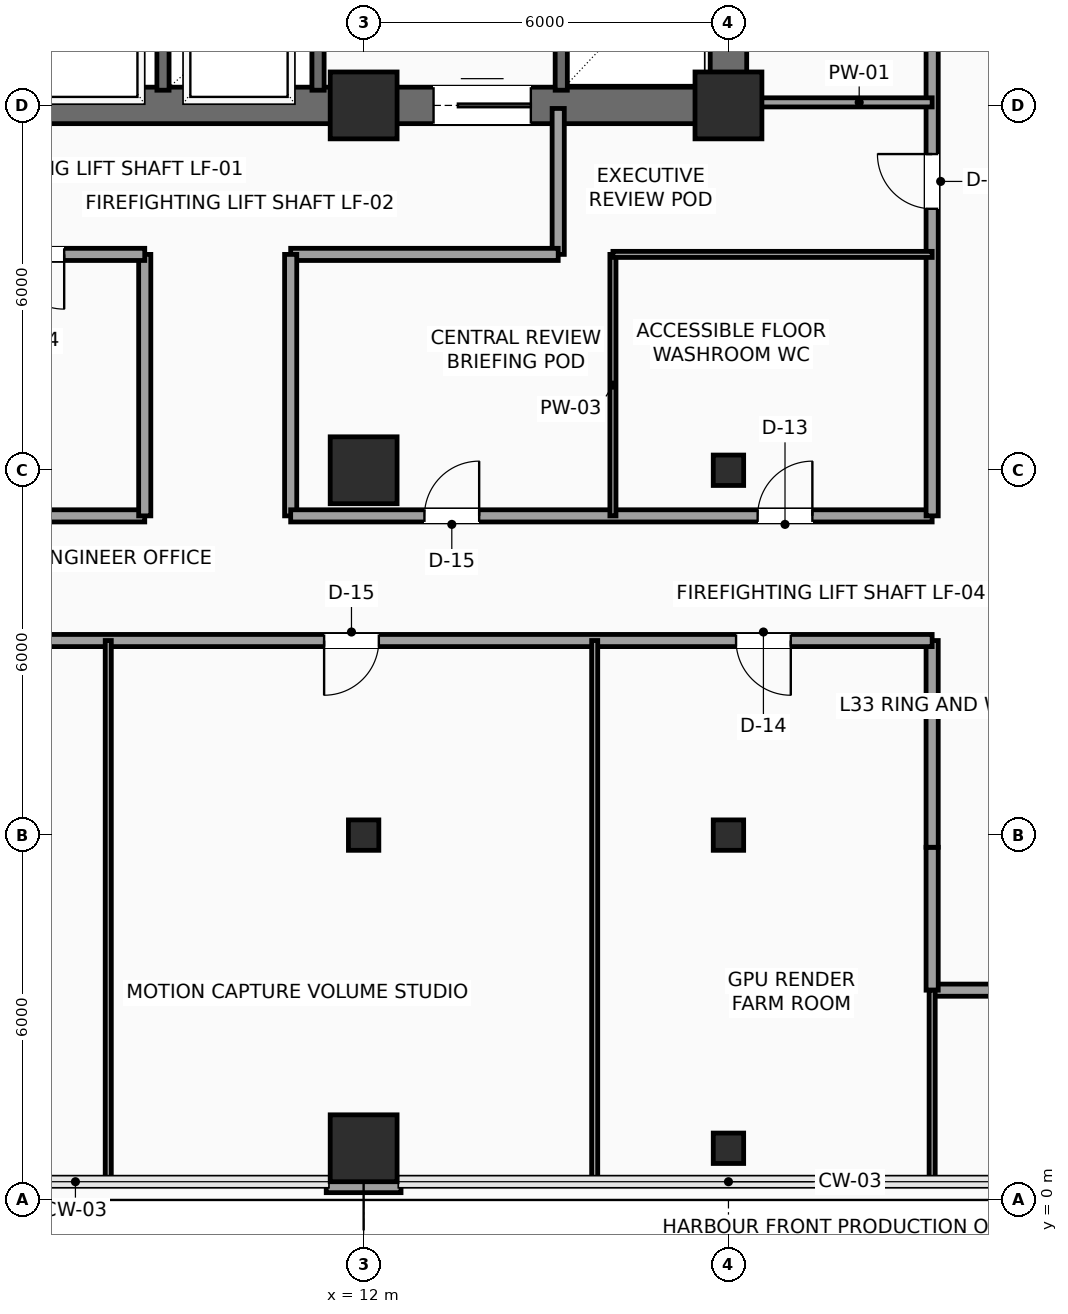
"""IFC4 building model, lengths in metres.
Left out: names, types, materials, properties, quantities, classifications, styles, units other than length and angle.
Written with IfcOpenShell. Run it as: python <this file> out.ifc"""

import sys

from ifc_helpers import new_model, si_unit, direction, frame, frame_2d, origin, origin_2d, place, context, subcontext, project, spatial, rectangle, hollow_rectangle, extrude, element, fill, save


model = new_model("IFC4")
c1 = context("Model", 3, precision=1e-05, world=origin(), true_north=direction((0.0, 1.0)))
c2 = subcontext(c1, "Body", "Model", "MODEL_VIEW")
j1 = project(units=[si_unit("LENGTHUNIT", "METRE"), si_unit("PLANEANGLEUNIT", "RADIAN")], contexts=[c1])
p1 = place(None, origin())
s1 = spatial("IfcSite", under=j1, at=p1, CompositionType="ELEMENT")
p2 = place(p1, origin())
s2 = spatial("IfcBuilding", under=s1, at=p2, CompositionType="ELEMENT")
p3 = place(p2, frame((0.0, 0.0, 138.15)))
s3 = spatial("IfcBuildingStorey", under=s2, at=p3, CompositionType="ELEMENT", Elevation=138.15)
for number, where, z_axis, x_axis in (
    (1, (12.0, 18.0, 0.0), (0.0, 0.0, 1.0), (1.0, 0.0, 0.0)),
    (2, (18.0, 18.0, 0.0), (0.0, 0.0, 1.0), (1.0, 0.0, 0.0)),
    (3, (12.0, 0.85, 0.0), (0.0, 0.0, 1.0), (1.0, 0.0, 0.0)),
):
    element("IfcColumn", number, at=place(p3, frame(where, z_axis=z_axis, x_axis=x_axis)), inside=s3, PredefinedType="COLUMN", context=c2, shape_type="SweptSolid", body=[
        extrude(rectangle(XDim=1.1, YDim=1.1, at=origin_2d()), origin(), (0.0, 0.0, 1.0), 3.75),
    ])
p4 = place(p3, frame((12.0, 6.0, 0.0), z_axis=(0.0, 0.0, 1.0), x_axis=(1.0, 0.0, 0.0)))
e4 = element("IfcColumn", 4, at=p4, inside=s3, PredefinedType="COLUMN", context=c2, shape_type="SweptSolid", body=[
    extrude(hollow_rectangle(XDim=0.5, YDim=0.5, WallThickness=0.025, InnerFilletRadius=0.025, OuterFilletRadius=0.04, at=origin_2d()), origin(), (0.0, 0.0, 1.0), 3.75),
])
p5 = place(p3, frame((12.0, 12.0, 0.0), z_axis=(0.0, 0.0, 1.0), x_axis=(1.0, 0.0, 0.0)))
e5 = element("IfcColumn", 5, at=p5, inside=s3, PredefinedType="COLUMN", context=c2, shape_type="SweptSolid", body=[
    extrude(rectangle(XDim=1.1, YDim=1.1, at=origin_2d()), origin(), (0.0, 0.0, 1.0), 3.75),
])
for number, where, z_axis, x_axis in (
    (6, (18.0, 0.85, 0.0), (0.0, 0.0, 1.0), (1.0, 0.0, 0.0)),
    (7, (18.0, 6.0, 0.0), (0.0, 0.0, 1.0), (1.0, 0.0, 0.0)),
    (8, (18.0, 12.0, 0.0), (0.0, 0.0, 1.0), (1.0, 0.0, 0.0)),
):
    element("IfcColumn", number, at=place(p3, frame(where, z_axis=z_axis, x_axis=x_axis)), inside=s3, PredefinedType="COLUMN", context=c2, shape_type="SweptSolid", body=[
        extrude(hollow_rectangle(XDim=0.5, YDim=0.5, WallThickness=0.025, InnerFilletRadius=0.025, OuterFilletRadius=0.04, at=origin_2d()), origin(), (0.0, 0.0, 1.0), 3.75),
    ])
p6 = place(p3, frame((12.615, 0.24, 0.0), z_axis=(0.0, 0.0, 1.0), x_axis=(-1.0, 0.0, 0.0)))
e9 = element("IfcWall", 9, at=p6, inside=s3, PredefinedType="SOLIDWALL", context=c2, shape_type="SweptSolid", body=[
    extrude(rectangle(XDim=1.23, YDim=0.24, at=frame_2d((0.615, 0.0))), origin(), (0.0, 0.0, 1.0), 3.525),
])
p7 = place(p3, frame((6.0, 18.0, 0.0), z_axis=(0.0, 0.0, 1.0), x_axis=(1.0, 0.0, 0.0)))
e10 = element("IfcWall", 10, at=p7, inside=s3, PredefinedType="SHEAR", context=c2, shape_type="SweptSolid", body=[
    extrude(rectangle(XDim=12.0, YDim=0.6, at=frame_2d((6.0, 0.0))), origin(), (0.0, 0.0, 1.0), 3.525),
])
p8 = place(p7, frame((7.15, 0.0, 0.0)))
e11 = element("IfcOpeningElement", 11, at=p8, cuts=e10, PredefinedType="OPENING", context=c2, shape_type="SweptSolid", body=[
    extrude(rectangle(XDim=1.6, YDim=2.3, at=frame_2d((0.8, 1.15))), frame((0.0, 0.31, 0.0), z_axis=(0.0, -1.0, 0.0), x_axis=(1.0, 0.0, 0.0)), (0.0, 0.0, 1.0), 0.62),
])
p9 = place(p3, frame((18.0, 18.0, 0.0), z_axis=(0.0, 0.0, 1.0), x_axis=(0.0, 1.0, 0.0)))
e12 = element("IfcWall", 12, at=p9, inside=s3, PredefinedType="SHEAR", context=c2, shape_type="SweptSolid", body=[
    extrude(rectangle(XDim=9.6, YDim=0.6, at=frame_2d((4.8, 0.0))), origin(), (0.0, 0.0, 1.0), 3.525),
])
for number, where, z_axis, x_axis in (
    (13, (8.7, 18.25, 0.0), (0.0, 0.0, 1.0), (0.0, 1.0, 0.0)),
    (14, (11.25, 18.25, 0.0), (0.0, 0.0, 1.0), (0.0, 1.0, 0.0)),
):
    element("IfcWall", number, at=place(p3, frame(where, z_axis=z_axis, x_axis=x_axis)), inside=s3, PredefinedType="SHEAR", context=c2, shape_type="SweptSolid", body=[
        extrude(rectangle(XDim=2.17, YDim=0.2, at=frame_2d((1.085, 0.0))), origin(), (0.0, 0.0, 1.0), 3.525),
    ])
p10 = place(p3, frame((15.25, 18.25, 0.0), z_axis=(0.0, 0.0, 1.0), x_axis=(0.0, 1.0, 0.0)))
e15 = element("IfcWall", 15, at=p10, inside=s3, PredefinedType="SHEAR", context=c2, shape_type="SweptSolid", body=[
    extrude(rectangle(XDim=5.2, YDim=0.2, at=frame_2d((2.6, 0.0))), origin(), (0.0, 0.0, 1.0), 3.525),
])
p11 = place(p3, frame((23.95, 3.45, 0.0), z_axis=(0.0, 0.0, 1.0), x_axis=(-1.0, 0.0, 0.0)))
e16 = element("IfcWall", 16, at=p11, inside=s3, PredefinedType="PARTITIONING", context=c2, shape_type="SweptSolid", body=[
    extrude(rectangle(XDim=2.6, YDim=0.2, at=frame_2d((1.3, 0.0))), origin(), (0.0, 0.0, 1.0), 3.067),
])
p12 = place(p3, frame((21.35, 3.45, 0.0), z_axis=(0.0, 0.0, 1.0), x_axis=(0.0, 1.0, 0.0)))
e17 = element("IfcWall", 17, at=p12, inside=s3, PredefinedType="PARTITIONING", context=c2, shape_type="SweptSolid", body=[
    extrude(rectangle(XDim=2.35, YDim=0.2, at=frame_2d((1.175, 0.0))), origin(), (0.0, 0.0, 1.0), 3.525),
])
p13 = place(p3, frame((21.35, 5.8, 0.0), z_axis=(0.0, 0.0, 1.0), x_axis=(0.0, 1.0, 0.0)))
e18 = element("IfcWall", 18, at=p13, inside=s3, PredefinedType="PARTITIONING", context=c2, shape_type="SweptSolid", body=[
    extrude(rectangle(XDim=3.4, YDim=0.2, at=frame_2d((1.7, 0.0))), origin(), (0.0, 0.0, 1.0), 3.525),
])
p14 = place(p3, frame((21.35, 9.2, 0.0), z_axis=(0.0, 0.0, 1.0), x_axis=(-1.0, 0.0, 0.0)))
e19 = element("IfcWall", 19, at=p14, inside=s3, PredefinedType="PARTITIONING", context=c2, shape_type="SweptSolid", body=[
    extrude(rectangle(XDim=18.15, YDim=0.2, at=frame_2d((9.075, 0.0))), origin(), (0.0, 0.0, 1.0), 3.067),
])
p15 = place(p14, frame((15.4, 0.0, 0.0)))
e20 = element("IfcOpeningElement", 20, at=p15, cuts=e19, PredefinedType="OPENING", context=c2, shape_type="SweptSolid", body=[
    extrude(rectangle(XDim=0.9, YDim=2.1, at=frame_2d((0.45, 1.05))), frame((0.0, 0.11, 0.0), z_axis=(0.0, -1.0, 0.0), x_axis=(1.0, 0.0, 0.0)), (0.0, 0.0, 1.0), 0.22),
])
p16 = place(p14, frame((9.1, 0.0, 0.0)))
e21 = element("IfcOpeningElement", 21, at=p16, cuts=e19, PredefinedType="OPENING", context=c2, shape_type="SweptSolid", body=[
    extrude(rectangle(XDim=0.9, YDim=2.1, at=frame_2d((0.45, 1.05))), frame((0.0, 0.11, 0.0), z_axis=(0.0, -1.0, 0.0), x_axis=(1.0, 0.0, 0.0)), (0.0, 0.0, 1.0), 0.22),
])
p17 = place(p14, frame((2.325, 0.0, 0.0)))
e22 = element("IfcOpeningElement", 22, at=p17, cuts=e19, PredefinedType="OPENING", context=c2, shape_type="SweptSolid", body=[
    extrude(rectangle(XDim=0.9, YDim=2.1, at=frame_2d((0.45, 1.05))), frame((0.0, 0.11, 0.0), z_axis=(0.0, -1.0, 0.0), x_axis=(1.0, 0.0, 0.0)), (0.0, 0.0, 1.0), 0.22),
])
p18 = place(p3, frame((3.2, 11.25, 0.0), z_axis=(0.0, 0.0, 1.0), x_axis=(1.0, 0.0, 0.0)))
e23 = element("IfcWall", 23, at=p18, inside=s3, PredefinedType="PARTITIONING", context=c2, shape_type="SweptSolid", body=[
    extrude(rectangle(XDim=5.2, YDim=0.2, at=frame_2d((2.6, 0.0))), origin(), (0.0, 0.0, 1.0), 3.525),
])
p19 = place(p3, frame((8.4, 11.25, 0.0), z_axis=(0.0, 0.0, 1.0), x_axis=(0.0, 1.0, 0.0)))
e24 = element("IfcWall", 24, at=p19, inside=s3, PredefinedType="PARTITIONING", context=c2, shape_type="SweptSolid", body=[
    extrude(rectangle(XDim=4.3, YDim=0.2, at=frame_2d((2.15, 0.0))), origin(), (0.0, 0.0, 1.0), 3.525),
])
p20 = place(p3, frame((8.4, 15.55, 0.0), z_axis=(0.0, 0.0, 1.0), x_axis=(-1.0, 0.0, 0.0)))
e25 = element("IfcWall", 25, at=p20, inside=s3, PredefinedType="PARTITIONING", context=c2, shape_type="SweptSolid", body=[
    extrude(rectangle(XDim=8.1, YDim=0.2, at=frame_2d((4.05, 0.0))), origin(), (0.0, 0.0, 1.0), 3.525),
])
p21 = place(p20, frame((5.35, 0.0, 0.0)))
e26 = element("IfcOpeningElement", 26, at=p21, cuts=e25, PredefinedType="OPENING", context=c2, shape_type="SweptSolid", body=[
    extrude(rectangle(XDim=0.9, YDim=2.1, at=frame_2d((0.45, 1.05))), frame((0.0, 0.11, 0.0), z_axis=(0.0, -1.0, 0.0), x_axis=(1.0, 0.0, 0.0)), (0.0, 0.0, 1.0), 0.22),
])
p22 = place(p20, frame((1.325, 0.0, 0.0)))
e27 = element("IfcOpeningElement", 27, at=p22, cuts=e25, PredefinedType="OPENING", context=c2, shape_type="SweptSolid", body=[
    extrude(rectangle(XDim=0.9, YDim=2.1, at=frame_2d((0.45, 1.05))), frame((0.0, 0.11, 0.0), z_axis=(0.0, -1.0, 0.0), x_axis=(1.0, 0.0, 0.0)), (0.0, 0.0, 1.0), 0.22),
])
p23 = place(p3, frame((15.2, 17.95, 0.0), z_axis=(0.0, 0.0, 1.0), x_axis=(0.0, -1.0, 0.0)))
e28 = element("IfcWall", 28, at=p23, inside=s3, PredefinedType="PARTITIONING", context=c2, shape_type="SweptSolid", body=[
    extrude(rectangle(XDim=2.4, YDim=0.2, at=frame_2d((1.2, 0.0))), origin(), (0.0, 0.0, 1.0), 3.525),
])
p24 = place(p3, frame((15.2, 15.55, 0.0), z_axis=(0.0, 0.0, 1.0), x_axis=(-1.0, 0.0, 0.0)))
e29 = element("IfcWall", 29, at=p24, inside=s3, PredefinedType="PARTITIONING", context=c2, shape_type="SweptSolid", body=[
    extrude(rectangle(XDim=4.4, YDim=0.2, at=frame_2d((2.2, 0.0))), origin(), (0.0, 0.0, 1.0), 3.525),
])
p25 = place(p3, frame((10.8, 15.55, 0.0), z_axis=(0.0, 0.0, 1.0), x_axis=(0.0, -1.0, 0.0)))
e30 = element("IfcWall", 30, at=p25, inside=s3, PredefinedType="PARTITIONING", context=c2, shape_type="SweptSolid", body=[
    extrude(rectangle(XDim=4.3, YDim=0.2, at=frame_2d((2.15, 0.0))), origin(), (0.0, 0.0, 1.0), 3.525),
])
p26 = place(p3, frame((10.8, 11.25, 0.0), z_axis=(0.0, 0.0, 1.0), x_axis=(1.0, 0.0, 0.0)))
e31 = element("IfcWall", 31, at=p26, inside=s3, PredefinedType="PARTITIONING", context=c2, shape_type="SweptSolid", body=[
    extrude(rectangle(XDim=10.55, YDim=0.2, at=frame_2d((5.275, 0.0))), origin(), (0.0, 0.0, 1.0), 3.525),
])
p27 = place(p26, frame((2.2, 0.0, 0.0)))
e32 = element("IfcOpeningElement", 32, at=p27, cuts=e31, PredefinedType="OPENING", context=c2, shape_type="SweptSolid", body=[
    extrude(rectangle(XDim=0.9, YDim=2.1, at=frame_2d((0.45, 1.05))), frame((0.0, 0.11, 0.0), z_axis=(0.0, -1.0, 0.0), x_axis=(1.0, 0.0, 0.0)), (0.0, 0.0, 1.0), 0.22),
])
p28 = place(p26, frame((7.68, 0.0, 0.0)))
e33 = element("IfcOpeningElement", 33, at=p28, cuts=e31, PredefinedType="OPENING", context=c2, shape_type="SweptSolid", body=[
    extrude(rectangle(XDim=0.9, YDim=2.1, at=frame_2d((0.45, 1.05))), frame((0.0, 0.11, 0.0), z_axis=(0.0, -1.0, 0.0), x_axis=(1.0, 0.0, 0.0)), (0.0, 0.0, 1.0), 0.22),
])
p29 = place(p3, frame((21.35, 11.25, 0.0), z_axis=(0.0, 0.0, 1.0), x_axis=(0.0, 1.0, 0.0)))
e34 = element("IfcWall", 34, at=p29, inside=s3, PredefinedType="PARTITIONING", context=c2, shape_type="SweptSolid", body=[
    extrude(rectangle(XDim=19.0, YDim=0.2, at=frame_2d((9.5, 0.0))), origin(), (0.0, 0.0, 1.0), 3.525),
])
p30 = place(p29, frame((8.7, 0.0, 0.0)))
e35 = element("IfcOpeningElement", 35, at=p30, cuts=e34, PredefinedType="OPENING", context=c2, shape_type="SweptSolid", body=[
    extrude(rectangle(XDim=0.95, YDim=2.15, at=frame_2d((0.475, 1.075))), frame((0.0, 0.11, 0.0), z_axis=(0.0, -1.0, 0.0), x_axis=(1.0, 0.0, 0.0)), (0.0, 0.0, 1.0), 0.22),
])
p31 = place(p29, frame((13.475, 0.0, 0.0)))
e36 = element("IfcOpeningElement", 36, at=p31, cuts=e34, PredefinedType="OPENING", context=c2, shape_type="SweptSolid", body=[
    extrude(rectangle(XDim=0.9, YDim=2.1, at=frame_2d((0.45, 1.05))), frame((0.0, 0.11, 0.0), z_axis=(0.0, -1.0, 0.0), x_axis=(1.0, 0.0, 0.0)), (0.0, 0.0, 1.0), 0.22),
])
p32 = place(p29, frame((5.05, 0.0, 0.0)))
e37 = element("IfcOpeningElement", 37, at=p32, cuts=e34, PredefinedType="OPENING", context=c2, shape_type="SweptSolid", body=[
    extrude(rectangle(XDim=0.9, YDim=2.1, at=frame_2d((0.45, 1.05))), frame((0.0, 0.11, 0.0), z_axis=(0.0, -1.0, 0.0), x_axis=(1.0, 0.0, 0.0)), (0.0, 0.0, 1.0), 0.22),
])
p33 = place(p3, frame((16.1, 11.25, 0.0), z_axis=(0.0, 0.0, 1.0), x_axis=(0.0, 1.0, 0.0)))
e38 = element("IfcWall", 38, at=p33, inside=s3, PredefinedType="PARTITIONING", context=c2, shape_type="SweptSolid", body=[
    extrude(rectangle(XDim=4.3, YDim=0.1, at=frame_2d((2.15, 0.0))), origin(), (0.0, 0.0, 1.0), 3.525),
])
p34 = place(p3, frame((16.1, 15.55, 0.0), z_axis=(0.0, 0.0, 1.0), x_axis=(1.0, 0.0, 0.0)))
e39 = element("IfcWall", 39, at=p34, inside=s3, PredefinedType="PARTITIONING", context=c2, shape_type="SweptSolid", body=[
    extrude(rectangle(XDim=5.25, YDim=0.1, at=frame_2d((2.625, 0.0))), origin(), (0.0, 0.0, 1.0), 3.525),
])
p35 = place(p3, frame((18.1, 18.05, 0.0), z_axis=(0.0, 0.0, 1.0), x_axis=(1.0, 0.0, 0.0)))
e40 = element("IfcWall", 40, at=p35, inside=s3, PredefinedType="PARTITIONING", context=c2, shape_type="SweptSolid", body=[
    extrude(rectangle(XDim=3.25, YDim=0.15, at=frame_2d((1.625, 0.0))), origin(), (0.0, 0.0, 1.0), 3.017),
])
p36 = place(p3, frame((21.35, 0.3, 0.0), z_axis=(0.0, 0.0, 1.0), x_axis=(0.0, 1.0, 0.0)))
e41 = element("IfcWall", 41, at=p36, inside=s3, PredefinedType="PARTITIONING", context=c2, shape_type="SweptSolid", body=[
    extrude(rectangle(XDim=3.15, YDim=0.1, at=frame_2d((1.575, 0.0))), origin(), (0.0, 0.0, 1.0), 3.525),
])
p37 = place(p3, frame((0.35, 0.35, 0.0), z_axis=(0.0, 0.0, 1.0), x_axis=(0.999977434951, -0.006717855945, 0.0)))
e42 = element("IfcWall", 42, at=p37, inside=s3, PredefinedType="PARTITIONING", context=c2, shape_type="SweptSolid", body=[
    extrude(rectangle(XDim=7.45, YDim=0.1, at=frame_2d((3.725, 0.0))), origin(), (0.0, 0.0, 1.0), 3.525),
])
for number, where, z_axis, x_axis in (
    (43, (7.8, 0.3, 0.0), (0.0, 0.0, 1.0), (0.0, 1.0, 0.0)),
    (44, (15.8, 0.3, 0.0), (0.0, 0.0, 1.0), (0.0, 1.0, 0.0)),
):
    element("IfcWall", number, at=place(p3, frame(where, z_axis=z_axis, x_axis=x_axis)), inside=s3, PredefinedType="PARTITIONING", context=c2, shape_type="SweptSolid", body=[
        extrude(rectangle(XDim=8.9, YDim=0.1, at=frame_2d((4.45, 0.0))), origin(), (0.0, 0.0, 1.0), 3.525),
    ])
p38 = place(p8, origin())
e45 = element("IfcDoor", 45, at=p38, inside=s3, OperationType="DOUBLE_DOOR_SLIDING", PredefinedType="DOOR", context=c2, shape_type="SweptSolid", body=[
    extrude(rectangle(XDim=1.6, YDim=2.3, at=frame_2d((0.8, 1.15))), frame((0.0, 0.025, 0.0), z_axis=(0.0, -1.0, 0.0), x_axis=(1.0, 0.0, 0.0)), (0.0, 0.0, 1.0), 0.05),
])
fill(e11, e45)
p39 = place(p16, origin())
e46 = element("IfcDoor", 46, at=p39, inside=s3, OperationType="SINGLE_SWING_RIGHT", PredefinedType="DOOR", context=c2, shape_type="SweptSolid", body=[
    extrude(rectangle(XDim=0.9, YDim=2.1, at=frame_2d((0.45, 1.05))), frame((0.0, 0.025, 0.0), z_axis=(0.0, -1.0, 0.0), x_axis=(1.0, 0.0, 0.0)), (0.0, 0.0, 1.0), 0.05),
])
fill(e21, e46)
p40 = place(p17, origin())
e47 = element("IfcDoor", 47, at=p40, inside=s3, OperationType="SINGLE_SWING_LEFT", PredefinedType="DOOR", context=c2, shape_type="SweptSolid", body=[
    extrude(rectangle(XDim=0.9, YDim=2.1, at=frame_2d((0.45, 1.05))), frame((0.0, 0.025, 0.0), z_axis=(0.0, -1.0, 0.0), x_axis=(1.0, 0.0, 0.0)), (0.0, 0.0, 1.0), 0.05),
])
fill(e22, e47)
p41 = place(p22, origin())
e48 = element("IfcDoor", 48, at=p41, inside=s3, OperationType="SINGLE_SWING_LEFT", PredefinedType="DOOR", context=c2, shape_type="SweptSolid", body=[
    extrude(rectangle(XDim=0.9, YDim=2.1, at=frame_2d((0.45, 1.05))), frame((0.0, 0.025, 0.0), z_axis=(0.0, -1.0, 0.0), x_axis=(1.0, 0.0, 0.0)), (0.0, 0.0, 1.0), 0.05),
])
fill(e27, e48)
p42 = place(p27, origin())
e49 = element("IfcDoor", 49, at=p42, inside=s3, OperationType="SINGLE_SWING_RIGHT", PredefinedType="DOOR", context=c2, shape_type="SweptSolid", body=[
    extrude(rectangle(XDim=0.9, YDim=2.1, at=frame_2d((0.45, 1.05))), frame((0.0, 0.025, 0.0), z_axis=(0.0, -1.0, 0.0), x_axis=(1.0, 0.0, 0.0)), (0.0, 0.0, 1.0), 0.05),
])
fill(e32, e49)
p43 = place(p28, origin())
e50 = element("IfcDoor", 50, at=p43, inside=s3, OperationType="SINGLE_SWING_RIGHT", PredefinedType="DOOR", context=c2, shape_type="SweptSolid", body=[
    extrude(rectangle(XDim=0.9, YDim=2.1, at=frame_2d((0.45, 1.05))), frame((0.0, 0.025, 0.0), z_axis=(0.0, -1.0, 0.0), x_axis=(1.0, 0.0, 0.0)), (0.0, 0.0, 1.0), 0.05),
])
fill(e33, e50)
p44 = place(p32, origin())
e51 = element("IfcDoor", 51, at=p44, inside=s3, OperationType="SINGLE_SWING_RIGHT", PredefinedType="DOOR", context=c2, shape_type="SweptSolid", body=[
    extrude(rectangle(XDim=0.9, YDim=2.1, at=frame_2d((0.45, 1.05))), frame((0.0, 0.025, 0.0), z_axis=(0.0, -1.0, 0.0), x_axis=(1.0, 0.0, 0.0)), (0.0, 0.0, 1.0), 0.05),
])
fill(e37, e51)
save(model, sys.argv[1])
